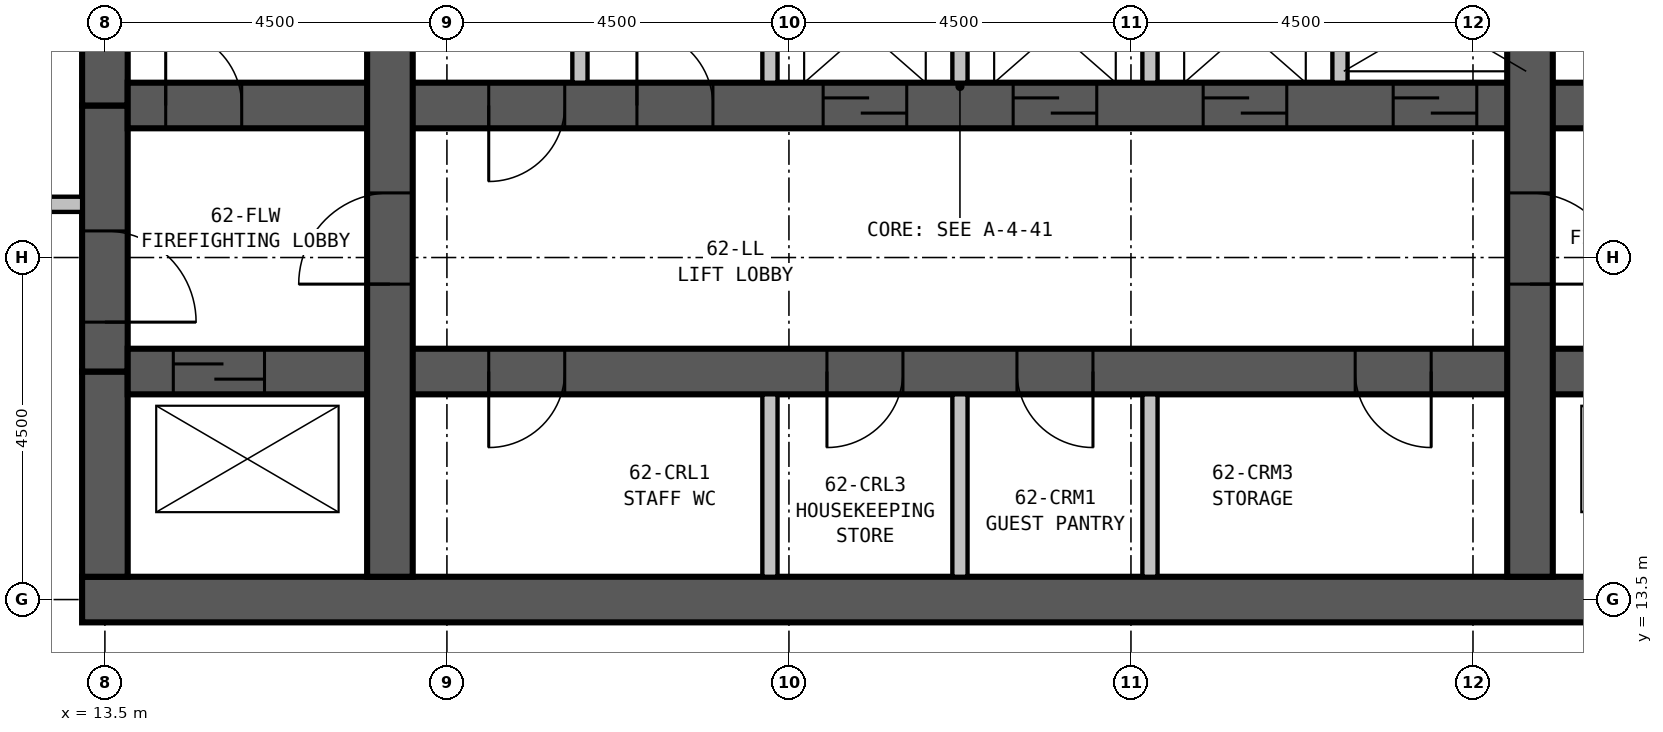
"""IFC4 building model, lengths in metres.
Left out: names, types, materials, properties, quantities, classifications, styles, units other than length and angle.
Written with IfcOpenShell. Run it as: python <this file> out.ifc"""

import sys

from ifc_helpers import new_model, si_unit, direction, frame, frame_2d, origin, place, context, subcontext, project, spatial, rectangle, extrude, element, fill, save


model = new_model("IFC4")
c1 = context("Model", 3, precision=1e-05, world=origin(), true_north=direction((0.0, 1.0)))
c2 = subcontext(c1, "Body", "Model", "MODEL_VIEW")
j1 = project(units=[si_unit("LENGTHUNIT", "METRE"), si_unit("PLANEANGLEUNIT", "RADIAN")], contexts=[c1])
p1 = place(None, origin())
s1 = spatial("IfcSite", under=j1, at=p1, CompositionType="ELEMENT")
p2 = place(p1, origin())
s2 = spatial("IfcBuilding", under=s1, at=p2, CompositionType="ELEMENT")
p3 = place(p2, frame((0.0, 0.0, 240.8)))
s3 = spatial("IfcBuildingStorey", under=s2, at=p3, CompositionType="ELEMENT", Elevation=240.8)
p4 = place(p3, frame((13.2, 13.5, 0.0), z_axis=(0.0, 0.0, 1.0), x_axis=(1.0, 0.0, 0.0)))
e1 = element("IfcWall", 1, at=p4, inside=s3, PredefinedType="SHEAR", context=c2, shape_type="SweptSolid", body=[
    extrude(rectangle(XDim=23.1, YDim=0.6, at=frame_2d((11.55, 0.0))), origin(), (0.0, 0.0, 1.0), 3.9),
])
p5 = place(p3, frame((17.25, 13.8, 0.0), z_axis=(0.0, 0.0, 1.0), x_axis=(0.0, 1.0, 0.0)))
e2 = element("IfcWall", 2, at=p5, inside=s3, PredefinedType="SHEAR", context=c2, shape_type="SweptSolid", body=[
    extrude(rectangle(XDim=12.9, YDim=0.6, at=frame_2d((6.45, 0.0))), origin(), (0.0, 0.0, 1.0), 3.9),
])
p6 = place(p5, frame((3.85, 0.0, 0.0)))
e3 = element("IfcOpeningElement", 3, at=p6, cuts=e2, PredefinedType="OPENING", context=c2, shape_type="SweptSolid", body=[
    extrude(rectangle(XDim=1.2, YDim=2.1, at=frame_2d((0.6, 1.05))), frame((0.0, 0.31, 0.0), z_axis=(0.0, -1.0, 0.0), x_axis=(1.0, 0.0, 0.0)), (0.0, 0.0, 1.0), 0.62),
])
p7 = place(p3, frame((32.25, 13.8, 0.0), z_axis=(0.0, 0.0, 1.0), x_axis=(0.0, 1.0, 0.0)))
e4 = element("IfcWall", 4, at=p7, inside=s3, PredefinedType="SHEAR", context=c2, shape_type="SweptSolid", body=[
    extrude(rectangle(XDim=12.9, YDim=0.6, at=frame_2d((6.45, 0.0))), origin(), (0.0, 0.0, 1.0), 3.9),
])
p8 = place(p7, frame((5.05, 0.0, 0.0), z_axis=(0.0, 0.0, 1.0), x_axis=(-1.0, 0.0, 0.0)))
e5 = element("IfcOpeningElement", 5, at=p8, cuts=e4, PredefinedType="OPENING", context=c2, shape_type="SweptSolid", body=[
    extrude(rectangle(XDim=1.2, YDim=2.1, at=frame_2d((0.6, 1.05))), frame((0.0, 0.31, 0.0), z_axis=(0.0, -1.0, 0.0), x_axis=(1.0, 0.0, 0.0)), (0.0, 0.0, 1.0), 0.62),
])
p9 = place(p3, frame((13.8, 16.5, 0.0), z_axis=(0.0, 0.0, 1.0), x_axis=(1.0, 0.0, 0.0)))
e6 = element("IfcWall", 6, at=p9, inside=s3, PredefinedType="SHEAR", context=c2, shape_type="SweptSolid", body=[
    extrude(rectangle(XDim=21.9, YDim=0.6, at=frame_2d((10.95, 0.0))), origin(), (0.0, 0.0, 1.0), 3.9),
])
p10 = place(p9, frame((5.75, 0.0, 0.0), z_axis=(0.0, 0.0, 1.0), x_axis=(-1.0, 0.0, 0.0)))
e7 = element("IfcOpeningElement", 7, at=p10, cuts=e6, PredefinedType="OPENING", context=c2, shape_type="SweptSolid", body=[
    extrude(rectangle(XDim=1.0, YDim=2.1, at=frame_2d((0.5, 1.05))), frame((0.0, 0.31, 0.0), z_axis=(0.0, -1.0, 0.0), x_axis=(1.0, 0.0, 0.0)), (0.0, 0.0, 1.0), 0.62),
])
p11 = place(p9, frame((10.2, 0.0, 0.0), z_axis=(0.0, 0.0, 1.0), x_axis=(-1.0, 0.0, 0.0)))
e8 = element("IfcOpeningElement", 8, at=p11, cuts=e6, PredefinedType="OPENING", context=c2, shape_type="SweptSolid", body=[
    extrude(rectangle(XDim=1.0, YDim=2.1, at=frame_2d((0.5, 1.05))), frame((0.0, 0.31, 0.0), z_axis=(0.0, -1.0, 0.0), x_axis=(1.0, 0.0, 0.0)), (0.0, 0.0, 1.0), 0.62),
])
p12 = place(p9, frame((12.7, 0.0, 0.0), z_axis=(0.0, 0.0, 1.0), x_axis=(-1.0, 0.0, 0.0)))
e9 = element("IfcOpeningElement", 9, at=p12, cuts=e6, PredefinedType="OPENING", context=c2, shape_type="SweptSolid", body=[
    extrude(rectangle(XDim=1.0, YDim=2.1, at=frame_2d((0.5, 1.05))), frame((0.0, 0.31, 0.0), z_axis=(0.0, -1.0, 0.0), x_axis=(1.0, 0.0, 0.0)), (0.0, 0.0, 1.0), 0.62),
])
p13 = place(p9, frame((17.15, 0.0, 0.0), z_axis=(0.0, 0.0, 1.0), x_axis=(-1.0, 0.0, 0.0)))
e10 = element("IfcOpeningElement", 10, at=p13, cuts=e6, PredefinedType="OPENING", context=c2, shape_type="SweptSolid", body=[
    extrude(rectangle(XDim=1.0, YDim=2.1, at=frame_2d((0.5, 1.05))), frame((0.0, 0.31, 0.0), z_axis=(0.0, -1.0, 0.0), x_axis=(1.0, 0.0, 0.0)), (0.0, 0.0, 1.0), 0.62),
])
p14 = place(p9, frame((0.6, 0.0, 0.0)))
e11 = element("IfcOpeningElement", 11, at=p14, cuts=e6, PredefinedType="OPENING", context=c2, shape_type="SweptSolid", body=[
    extrude(rectangle(XDim=1.2, YDim=2.1, at=frame_2d((0.6, 1.05))), frame((0.0, 0.31, 0.0), z_axis=(0.0, -1.0, 0.0), x_axis=(1.0, 0.0, 0.0)), (0.0, 0.0, 1.0), 0.62),
])
p15 = place(p9, frame((19.6, 0.0, 0.0)))
e12 = element("IfcOpeningElement", 12, at=p15, cuts=e6, PredefinedType="OPENING", context=c2, shape_type="SweptSolid", body=[
    extrude(rectangle(XDim=1.2, YDim=2.1, at=frame_2d((0.6, 1.05))), frame((0.0, 0.31, 0.0), z_axis=(0.0, -1.0, 0.0), x_axis=(1.0, 0.0, 0.0)), (0.0, 0.0, 1.0), 0.62),
])
p16 = place(p3, frame((13.8, 20.0, 0.0), z_axis=(0.0, 0.0, 1.0), x_axis=(1.0, 0.0, 0.0)))
e13 = element("IfcWall", 13, at=p16, inside=s3, PredefinedType="SHEAR", context=c2, shape_type="SweptSolid", body=[
    extrude(rectangle(XDim=21.9, YDim=0.6, at=frame_2d((10.95, 0.0))), origin(), (0.0, 0.0, 1.0), 3.9),
])
p17 = place(p16, frame((0.5, 0.0, 0.0)))
e14 = element("IfcOpeningElement", 14, at=p17, cuts=e13, PredefinedType="OPENING", context=c2, shape_type="SweptSolid", body=[
    extrude(rectangle(XDim=1.0, YDim=2.1, at=frame_2d((0.5, 1.05))), frame((0.0, 0.31, 0.0), z_axis=(0.0, -1.0, 0.0), x_axis=(1.0, 0.0, 0.0)), (0.0, 0.0, 1.0), 0.62),
])
p18 = place(p16, frame((20.5, 0.0, 0.0)))
e15 = element("IfcOpeningElement", 15, at=p18, cuts=e13, PredefinedType="OPENING", context=c2, shape_type="SweptSolid", body=[
    extrude(rectangle(XDim=1.0, YDim=2.1, at=frame_2d((0.5, 1.05))), frame((0.0, 0.31, 0.0), z_axis=(0.0, -1.0, 0.0), x_axis=(1.0, 0.0, 0.0)), (0.0, 0.0, 1.0), 0.62),
])
p19 = place(p16, frame((9.15, 0.0, 0.0)))
e16 = element("IfcOpeningElement", 16, at=p19, cuts=e13, PredefinedType="OPENING", context=c2, shape_type="SweptSolid", body=[
    extrude(rectangle(XDim=1.1, YDim=2.1, at=frame_2d((0.55, 1.05))), frame((0.0, 0.31, 0.0), z_axis=(0.0, -1.0, 0.0), x_axis=(1.0, 0.0, 0.0)), (0.0, 0.0, 1.0), 0.62),
])
p20 = place(p16, frame((11.65, 0.0, 0.0)))
e17 = element("IfcOpeningElement", 17, at=p20, cuts=e13, PredefinedType="OPENING", context=c2, shape_type="SweptSolid", body=[
    extrude(rectangle(XDim=1.1, YDim=2.1, at=frame_2d((0.55, 1.05))), frame((0.0, 0.31, 0.0), z_axis=(0.0, -1.0, 0.0), x_axis=(1.0, 0.0, 0.0)), (0.0, 0.0, 1.0), 0.62),
])
p21 = place(p16, frame((14.15, 0.0, 0.0)))
e18 = element("IfcOpeningElement", 18, at=p21, cuts=e13, PredefinedType="OPENING", context=c2, shape_type="SweptSolid", body=[
    extrude(rectangle(XDim=1.1, YDim=2.1, at=frame_2d((0.55, 1.05))), frame((0.0, 0.31, 0.0), z_axis=(0.0, -1.0, 0.0), x_axis=(1.0, 0.0, 0.0)), (0.0, 0.0, 1.0), 0.62),
])
p22 = place(p16, frame((16.65, 0.0, 0.0)))
e19 = element("IfcOpeningElement", 19, at=p22, cuts=e13, PredefinedType="OPENING", context=c2, shape_type="SweptSolid", body=[
    extrude(rectangle(XDim=1.1, YDim=2.1, at=frame_2d((0.55, 1.05))), frame((0.0, 0.31, 0.0), z_axis=(0.0, -1.0, 0.0), x_axis=(1.0, 0.0, 0.0)), (0.0, 0.0, 1.0), 0.62),
])
p23 = place(p16, frame((5.75, 0.0, 0.0), z_axis=(0.0, 0.0, 1.0), x_axis=(-1.0, 0.0, 0.0)))
e20 = element("IfcOpeningElement", 20, at=p23, cuts=e13, PredefinedType="OPENING", context=c2, shape_type="SweptSolid", body=[
    extrude(rectangle(XDim=1.0, YDim=2.1, at=frame_2d((0.5, 1.05))), frame((0.0, 0.31, 0.0), z_axis=(0.0, -1.0, 0.0), x_axis=(1.0, 0.0, 0.0)), (0.0, 0.0, 1.0), 0.62),
])
p24 = place(p16, frame((6.7, 0.0, 0.0)))
e21 = element("IfcOpeningElement", 21, at=p24, cuts=e13, PredefinedType="OPENING", context=c2, shape_type="SweptSolid", body=[
    extrude(rectangle(XDim=1.0, YDim=2.1, at=frame_2d((0.5, 1.05))), frame((0.0, 0.31, 0.0), z_axis=(0.0, -1.0, 0.0), x_axis=(1.0, 0.0, 0.0)), (0.0, 0.0, 1.0), 0.62),
])
p25 = place(p3, frame((13.5, 26.7, 0.0), z_axis=(0.0, 0.0, 1.0), x_axis=(0.0, -1.0, 0.0)))
e22 = element("IfcWall", 22, at=p25, inside=s3, PredefinedType="SHEAR", context=c2, shape_type="SweptSolid", body=[
    extrude(rectangle(XDim=6.7, YDim=0.6, at=frame_2d((3.35, 0.0))), origin(), (0.0, 0.0, 1.0), 3.9),
])
p26 = place(p3, frame((13.5, 20.0, 0.0), z_axis=(0.0, 0.0, 1.0), x_axis=(0.0, -1.0, 0.0)))
e23 = element("IfcWall", 23, at=p26, inside=s3, PredefinedType="SHEAR", context=c2, shape_type="SweptSolid", body=[
    extrude(rectangle(XDim=3.5, YDim=0.6, at=frame_2d((1.75, 0.0))), origin(), (0.0, 0.0, 1.0), 3.9),
])
p27 = place(p26, frame((1.65, 0.0, 0.0)))
e24 = element("IfcOpeningElement", 24, at=p27, cuts=e23, PredefinedType="OPENING", context=c2, shape_type="SweptSolid", body=[
    extrude(rectangle(XDim=1.2, YDim=2.1, at=frame_2d((0.6, 1.05))), frame((0.0, 0.31, 0.0), z_axis=(0.0, -1.0, 0.0), x_axis=(1.0, 0.0, 0.0)), (0.0, 0.0, 1.0), 0.62),
])
p28 = place(p3, frame((13.5, 16.5, 0.0), z_axis=(0.0, 0.0, 1.0), x_axis=(0.0, -1.0, 0.0)))
e25 = element("IfcWall", 25, at=p28, inside=s3, PredefinedType="SHEAR", context=c2, shape_type="SweptSolid", body=[
    extrude(rectangle(XDim=2.7, YDim=0.6, at=frame_2d((1.35, 0.0))), origin(), (0.0, 0.0, 1.0), 3.9),
])
p29 = place(p3, frame((13.517, 40.649, 0.0), z_axis=(0.0, 0.0, 1.0), x_axis=(-0.110433201132, -0.993883548555, 0.0)))
e26 = element("IfcWall", 26, at=p29, inside=s3, PredefinedType="STANDARD", context=c2, shape_type="SweptSolid", body=[
    extrude(rectangle(XDim=31.994, YDim=0.3, at=frame_2d((15.997, 0.0))), origin(), (0.0, 0.0, 1.0), 2.45),
])
p30 = place(p29, frame((1.664, 0.0, 0.5)))
e27 = element("IfcOpeningElement", 27, at=p30, cuts=e26, PredefinedType="OPENING", context=c2, shape_type="SweptSolid", body=[
    extrude(rectangle(XDim=1.5, YDim=1.75, at=frame_2d((0.75, 0.875))), frame((0.0, 0.16, 0.0), z_axis=(0.0, -1.0, 0.0), x_axis=(1.0, 0.0, 0.0)), (0.0, 0.0, 1.0), 0.32),
])
p31 = place(p29, frame((6.192, 0.0, 0.5)))
e28 = element("IfcOpeningElement", 28, at=p31, cuts=e26, PredefinedType="OPENING", context=c2, shape_type="SweptSolid", body=[
    extrude(rectangle(XDim=1.5, YDim=1.75, at=frame_2d((0.75, 0.875))), frame((0.0, 0.16, 0.0), z_axis=(0.0, -1.0, 0.0), x_axis=(1.0, 0.0, 0.0)), (0.0, 0.0, 1.0), 0.32),
])
p32 = place(p29, frame((15.247, 0.0, 0.5)))
e29 = element("IfcOpeningElement", 29, at=p32, cuts=e26, PredefinedType="OPENING", context=c2, shape_type="SweptSolid", body=[
    extrude(rectangle(XDim=1.5, YDim=1.75, at=frame_2d((0.75, 0.875))), frame((0.0, 0.16, 0.0), z_axis=(0.0, -1.0, 0.0), x_axis=(1.0, 0.0, 0.0)), (0.0, 0.0, 1.0), 0.32),
])
p33 = place(p29, frame((19.775, 0.0, 0.5)))
e30 = element("IfcOpeningElement", 30, at=p33, cuts=e26, PredefinedType="OPENING", context=c2, shape_type="SweptSolid", body=[
    extrude(rectangle(XDim=1.5, YDim=1.75, at=frame_2d((0.75, 0.875))), frame((0.0, 0.16, 0.0), z_axis=(0.0, -1.0, 0.0), x_axis=(1.0, 0.0, 0.0)), (0.0, 0.0, 1.0), 0.32),
])
p34 = place(p29, frame((24.302, 0.0, 0.5)))
e31 = element("IfcOpeningElement", 31, at=p34, cuts=e26, PredefinedType="OPENING", context=c2, shape_type="SweptSolid", body=[
    extrude(rectangle(XDim=1.5, YDim=1.75, at=frame_2d((0.75, 0.875))), frame((0.0, 0.16, 0.0), z_axis=(0.0, -1.0, 0.0), x_axis=(1.0, 0.0, 0.0)), (0.0, 0.0, 1.0), 0.32),
])
p35 = place(p29, frame((28.83, 0.0, 0.5)))
e32 = element("IfcOpeningElement", 32, at=p35, cuts=e26, PredefinedType="OPENING", context=c2, shape_type="SweptSolid", body=[
    extrude(rectangle(XDim=1.5, YDim=1.75, at=frame_2d((0.75, 0.875))), frame((0.0, 0.16, 0.0), z_axis=(0.0, -1.0, 0.0), x_axis=(1.0, 0.0, 0.0)), (0.0, 0.0, 1.0), 0.32),
])
p36 = place(p3, frame((13.2, 18.7, 0.0), z_axis=(0.0, 0.0, 1.0), x_axis=(-1.0, 0.0, 0.0)))
e33 = element("IfcWall", 33, at=p36, inside=s3, PredefinedType="PARTITIONING", context=c2, shape_type="SweptSolid", body=[
    extrude(rectangle(XDim=1.35, YDim=0.2, at=frame_2d((0.675, 0.0))), origin(), (0.0, 0.0, 1.0), 3.65),
])
p37 = place(p3, frame((19.75, 20.3, 0.0), z_axis=(0.0, 0.0, 1.0), x_axis=(0.0, 1.0, 0.0)))
e34 = element("IfcWall", 34, at=p37, inside=s3, PredefinedType="PARTITIONING", context=c2, shape_type="SweptSolid", body=[
    extrude(rectangle(XDim=3.1, YDim=0.2, at=frame_2d((1.55, 0.0))), origin(), (0.0, 0.0, 1.0), 3.65),
])
p38 = place(p3, frame((22.25, 13.8, 0.0), z_axis=(0.0, 0.0, 1.0), x_axis=(0.0, 1.0, 0.0)))
e35 = element("IfcWall", 35, at=p38, inside=s3, PredefinedType="PARTITIONING", context=c2, shape_type="SweptSolid", body=[
    extrude(rectangle(XDim=2.4, YDim=0.2, at=frame_2d((1.2, 0.0))), origin(), (0.0, 0.0, 1.0), 3.65),
])
p39 = place(p3, frame((22.25, 20.3, 0.0), z_axis=(0.0, 0.0, 1.0), x_axis=(0.0, 1.0, 0.0)))
e36 = element("IfcWall", 36, at=p39, inside=s3, PredefinedType="PARTITIONING", context=c2, shape_type="SweptSolid", body=[
    extrude(rectangle(XDim=3.1, YDim=0.2, at=frame_2d((1.55, 0.0))), origin(), (0.0, 0.0, 1.0), 3.65),
])
p40 = place(p3, frame((24.75, 13.8, 0.0), z_axis=(0.0, 0.0, 1.0), x_axis=(0.0, 1.0, 0.0)))
e37 = element("IfcWall", 37, at=p40, inside=s3, PredefinedType="PARTITIONING", context=c2, shape_type="SweptSolid", body=[
    extrude(rectangle(XDim=2.4, YDim=0.2, at=frame_2d((1.2, 0.0))), origin(), (0.0, 0.0, 1.0), 3.65),
])
p41 = place(p3, frame((24.75, 20.3, 0.0), z_axis=(0.0, 0.0, 1.0), x_axis=(0.0, 1.0, 0.0)))
e38 = element("IfcWall", 38, at=p41, inside=s3, PredefinedType="PARTITIONING", context=c2, shape_type="SweptSolid", body=[
    extrude(rectangle(XDim=3.1, YDim=0.2, at=frame_2d((1.55, 0.0))), origin(), (0.0, 0.0, 1.0), 3.65),
])
p42 = place(p3, frame((27.25, 13.8, 0.0), z_axis=(0.0, 0.0, 1.0), x_axis=(0.0, 1.0, 0.0)))
e39 = element("IfcWall", 39, at=p42, inside=s3, PredefinedType="PARTITIONING", context=c2, shape_type="SweptSolid", body=[
    extrude(rectangle(XDim=2.4, YDim=0.2, at=frame_2d((1.2, 0.0))), origin(), (0.0, 0.0, 1.0), 3.65),
])
for number, where, z_axis, x_axis in (
    (40, (27.25, 20.3, 0.0), (0.0, 0.0, 1.0), (0.0, 1.0, 0.0)),
    (41, (29.75, 20.3, 0.0), (0.0, 0.0, 1.0), (0.0, 1.0, 0.0)),
):
    element("IfcWall", number, at=place(p3, frame(where, z_axis=z_axis, x_axis=x_axis)), inside=s3, PredefinedType="PARTITIONING", context=c2, shape_type="SweptSolid", body=[
        extrude(rectangle(XDim=3.1, YDim=0.2, at=frame_2d((1.55, 0.0))), origin(), (0.0, 0.0, 1.0), 3.65),
    ])
p43 = place(p27, origin())
e42 = element("IfcDoor", 42, at=p43, inside=s3, OperationType="SINGLE_SWING_RIGHT", PredefinedType="DOOR", context=c2, shape_type="SweptSolid", body=[
    extrude(rectangle(XDim=1.2, YDim=2.1, at=frame_2d((0.6, 1.05))), frame((0.0, 0.3, 0.0), z_axis=(0.0, -1.0, 0.0), x_axis=(1.0, 0.0, 0.0)), (0.0, 0.0, 1.0), 0.6),
])
fill(e24, e42)
p44 = place(p6, origin())
e43 = element("IfcDoor", 43, at=p44, inside=s3, OperationType="SINGLE_SWING_LEFT", PredefinedType="DOOR", context=c2, shape_type="SweptSolid", body=[
    extrude(rectangle(XDim=1.2, YDim=2.1, at=frame_2d((0.6, 1.05))), frame((0.0, 0.3, 0.0), z_axis=(0.0, -1.0, 0.0), x_axis=(1.0, 0.0, 0.0)), (0.0, 0.0, 1.0), 0.6),
])
fill(e3, e43)
p45 = place(p8, origin())
e44 = element("IfcDoor", 44, at=p45, inside=s3, OperationType="SINGLE_SWING_RIGHT", PredefinedType="DOOR", context=c2, shape_type="SweptSolid", body=[
    extrude(rectangle(XDim=1.2, YDim=2.1, at=frame_2d((0.6, 1.05))), frame((0.0, 0.3, 0.0), z_axis=(0.0, -1.0, 0.0), x_axis=(1.0, 0.0, 0.0)), (0.0, 0.0, 1.0), 0.6),
])
fill(e5, e44)
p46 = place(p17, origin())
e45 = element("IfcDoor", 45, at=p46, inside=s3, OperationType="SINGLE_SWING_LEFT", PredefinedType="DOOR", context=c2, shape_type="SweptSolid", body=[
    extrude(rectangle(XDim=1.0, YDim=2.1, at=frame_2d((0.5, 1.05))), frame((0.0, 0.3, 0.0), z_axis=(0.0, -1.0, 0.0), x_axis=(1.0, 0.0, 0.0)), (0.0, 0.0, 1.0), 0.6),
])
fill(e14, e45)
p47 = place(p19, origin())
e46 = element("IfcDoor", 46, at=p47, inside=s3, OperationType="SLIDING_TO_LEFT", PredefinedType="DOOR", context=c2, shape_type="SweptSolid", body=[
    extrude(rectangle(XDim=1.1, YDim=2.1, at=frame_2d((0.55, 1.05))), frame((0.0, 0.3, 0.0), z_axis=(0.0, -1.0, 0.0), x_axis=(1.0, 0.0, 0.0)), (0.0, 0.0, 1.0), 0.6),
])
fill(e16, e46)
p48 = place(p20, origin())
e47 = element("IfcDoor", 47, at=p48, inside=s3, OperationType="SLIDING_TO_LEFT", PredefinedType="DOOR", context=c2, shape_type="SweptSolid", body=[
    extrude(rectangle(XDim=1.1, YDim=2.1, at=frame_2d((0.55, 1.05))), frame((0.0, 0.3, 0.0), z_axis=(0.0, -1.0, 0.0), x_axis=(1.0, 0.0, 0.0)), (0.0, 0.0, 1.0), 0.6),
])
fill(e17, e47)
p49 = place(p21, origin())
e48 = element("IfcDoor", 48, at=p49, inside=s3, OperationType="SLIDING_TO_LEFT", PredefinedType="DOOR", context=c2, shape_type="SweptSolid", body=[
    extrude(rectangle(XDim=1.1, YDim=2.1, at=frame_2d((0.55, 1.05))), frame((0.0, 0.3, 0.0), z_axis=(0.0, -1.0, 0.0), x_axis=(1.0, 0.0, 0.0)), (0.0, 0.0, 1.0), 0.6),
])
fill(e18, e48)
p50 = place(p22, origin())
e49 = element("IfcDoor", 49, at=p50, inside=s3, OperationType="SLIDING_TO_LEFT", PredefinedType="DOOR", context=c2, shape_type="SweptSolid", body=[
    extrude(rectangle(XDim=1.1, YDim=2.1, at=frame_2d((0.55, 1.05))), frame((0.0, 0.3, 0.0), z_axis=(0.0, -1.0, 0.0), x_axis=(1.0, 0.0, 0.0)), (0.0, 0.0, 1.0), 0.6),
])
fill(e19, e49)
p51 = place(p10, origin())
e50 = element("IfcDoor", 50, at=p51, inside=s3, OperationType="SINGLE_SWING_RIGHT", PredefinedType="DOOR", context=c2, shape_type="SweptSolid", body=[
    extrude(rectangle(XDim=1.0, YDim=2.1, at=frame_2d((0.5, 1.05))), frame((0.0, 0.3, 0.0), z_axis=(0.0, -1.0, 0.0), x_axis=(1.0, 0.0, 0.0)), (0.0, 0.0, 1.0), 0.6),
])
fill(e7, e50)
p52 = place(p11, origin())
e51 = element("IfcDoor", 51, at=p52, inside=s3, OperationType="SINGLE_SWING_RIGHT", PredefinedType="DOOR", context=c2, shape_type="SweptSolid", body=[
    extrude(rectangle(XDim=1.0, YDim=2.1, at=frame_2d((0.5, 1.05))), frame((0.0, 0.3, 0.0), z_axis=(0.0, -1.0, 0.0), x_axis=(1.0, 0.0, 0.0)), (0.0, 0.0, 1.0), 0.6),
])
fill(e8, e51)
p53 = place(p12, origin())
e52 = element("IfcDoor", 52, at=p53, inside=s3, OperationType="SINGLE_SWING_LEFT", PredefinedType="DOOR", context=c2, shape_type="SweptSolid", body=[
    extrude(rectangle(XDim=1.0, YDim=2.1, at=frame_2d((0.5, 1.05))), frame((0.0, 0.3, 0.0), z_axis=(0.0, -1.0, 0.0), x_axis=(1.0, 0.0, 0.0)), (0.0, 0.0, 1.0), 0.6),
])
fill(e9, e52)
p54 = place(p13, origin())
e53 = element("IfcDoor", 53, at=p54, inside=s3, OperationType="SINGLE_SWING_LEFT", PredefinedType="DOOR", context=c2, shape_type="SweptSolid", body=[
    extrude(rectangle(XDim=1.0, YDim=2.1, at=frame_2d((0.5, 1.05))), frame((0.0, 0.3, 0.0), z_axis=(0.0, -1.0, 0.0), x_axis=(1.0, 0.0, 0.0)), (0.0, 0.0, 1.0), 0.6),
])
fill(e10, e53)
p55 = place(p23, origin())
e54 = element("IfcDoor", 54, at=p55, inside=s3, OperationType="SINGLE_SWING_RIGHT", PredefinedType="DOOR", context=c2, shape_type="SweptSolid", body=[
    extrude(rectangle(XDim=1.0, YDim=2.1, at=frame_2d((0.5, 1.05))), frame((0.0, 0.3, 0.0), z_axis=(0.0, -1.0, 0.0), x_axis=(1.0, 0.0, 0.0)), (0.0, 0.0, 1.0), 0.6),
])
fill(e20, e54)
p56 = place(p24, origin())
e55 = element("IfcDoor", 55, at=p56, inside=s3, OperationType="SINGLE_SWING_LEFT", PredefinedType="DOOR", context=c2, shape_type="SweptSolid", body=[
    extrude(rectangle(XDim=1.0, YDim=2.1, at=frame_2d((0.5, 1.05))), frame((0.0, 0.3, 0.0), z_axis=(0.0, -1.0, 0.0), x_axis=(1.0, 0.0, 0.0)), (0.0, 0.0, 1.0), 0.6),
])
fill(e21, e55)
p57 = place(p14, origin())
e56 = element("IfcDoor", 56, at=p57, inside=s3, OperationType="SLIDING_TO_LEFT", PredefinedType="DOOR", context=c2, shape_type="SweptSolid", body=[
    extrude(rectangle(XDim=1.2, YDim=2.1, at=frame_2d((0.6, 1.05))), frame((0.0, 0.3, 0.0), z_axis=(0.0, -1.0, 0.0), x_axis=(1.0, 0.0, 0.0)), (0.0, 0.0, 1.0), 0.6),
])
fill(e11, e56)
save(model, sys.argv[1])
